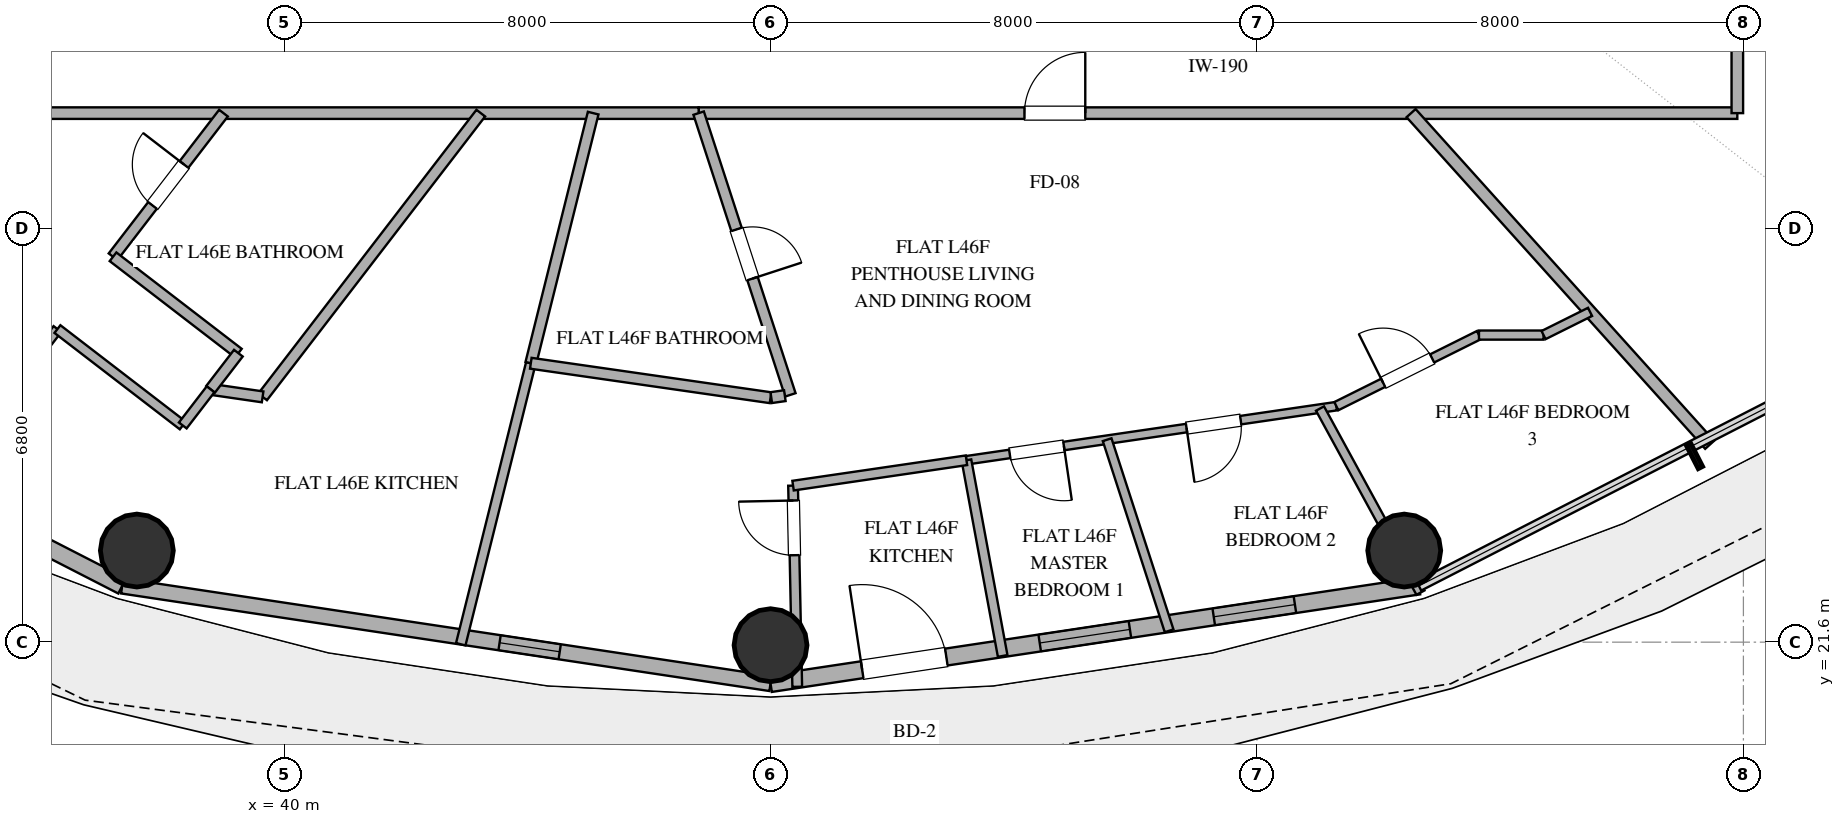
"""IFC4 building model, lengths in metres.
Left out: names, types, materials, properties, quantities, classifications, styles, units other than length and angle.
Written with IfcOpenShell. Run it as: python <this file> out.ifc"""

import sys

from ifc_helpers import new_model, si_unit, direction, frame, frame_2d, origin, origin_2d, place, context, subcontext, project, spatial, rectangle, hollow_circle, extrude, element, fill, save


model = new_model("IFC4")
c1 = context("Model", 3, precision=1e-05, world=origin(), true_north=direction((0.0, 1.0)))
c2 = subcontext(c1, "Body", "Model", "MODEL_VIEW")
j1 = project(units=[si_unit("LENGTHUNIT", "METRE"), si_unit("PLANEANGLEUNIT", "RADIAN")], contexts=[c1])
p1 = place(None, origin())
s1 = spatial("IfcSite", under=j1, at=p1, CompositionType="ELEMENT")
p2 = place(p1, origin())
s2 = spatial("IfcBuilding", under=s1, at=p2, CompositionType="ELEMENT")
p3 = place(p2, frame((0.0, 0.0, 183.0)))
s3 = spatial("IfcBuildingStorey", under=s2, at=p3, CompositionType="ELEMENT", Elevation=183.0)
for number, where, z_axis, x_axis in (
    (1, (37.578, 23.107, 0.0), (0.0, 0.0, 1.0), (1.0, 0.0, 0.0)),
    (2, (48.0, 21.55, 0.0), (0.0, 0.0, 1.0), (1.0, 0.0, 0.0)),
    (3, (58.422, 23.107, 0.0), (0.0, 0.0, 1.0), (1.0, 0.0, 0.0)),
):
    element("IfcColumn", number, at=place(p3, frame(where, z_axis=z_axis, x_axis=x_axis)), inside=s3, PredefinedType="COLUMN", context=c2, shape_type="SweptSolid", body=[
        extrude(hollow_circle(Radius=0.6, WallThickness=0.032, at=origin_2d()), origin(), (0.0, 0.0, 1.0), 3.38),
    ])
p4 = place(p3, frame((28.424, 27.094, 0.0), z_axis=(0.0, 0.0, 1.0), x_axis=(0.889872523182, -0.456209263919, 0.0)))
e4 = element("IfcWall", 4, at=p4, inside=s3, PredefinedType="SOLIDWALL", context=c2, shape_type="SweptSolid", body=[
    extrude(rectangle(XDim=10.016, YDim=0.28, at=frame_2d((5.008, 0.0))), origin(), (0.0, 0.0, 1.0), 3.38),
])
p5 = place(p4, frame((1.95, 0.0, 0.85)))
e5 = element("IfcOpeningElement", 5, at=p5, cuts=e4, PredefinedType="OPENING", context=c2, shape_type="SweptSolid", body=[
    extrude(rectangle(XDim=1.8, YDim=2.2, at=frame_2d((0.9, 1.1))), frame((0.0, 0.15, 0.0), z_axis=(0.0, -1.0, 0.0), x_axis=(1.0, 0.0, 0.0)), (0.0, 0.0, 1.0), 0.3),
])
p6 = place(p4, frame((4.109, 0.0, 0.85)))
e6 = element("IfcOpeningElement", 6, at=p6, cuts=e4, PredefinedType="OPENING", context=c2, shape_type="SweptSolid", body=[
    extrude(rectangle(XDim=1.8, YDim=2.2, at=frame_2d((0.9, 1.1))), frame((0.0, 0.15, 0.0), z_axis=(0.0, -1.0, 0.0), x_axis=(1.0, 0.0, 0.0)), (0.0, 0.0, 1.0), 0.3),
])
p7 = place(p4, frame((6.842, 0.0, 0.85)))
e7 = element("IfcOpeningElement", 7, at=p7, cuts=e4, PredefinedType="OPENING", context=c2, shape_type="SweptSolid", body=[
    extrude(rectangle(XDim=1.65, YDim=2.0, at=frame_2d((0.825, 1.0))), frame((0.0, 0.15, 0.0), z_axis=(0.0, -1.0, 0.0), x_axis=(1.0, 0.0, 0.0)), (0.0, 0.0, 1.0), 0.3),
])
p8 = place(p3, frame((37.337, 22.525, 0.0), z_axis=(0.0, 0.0, 1.0), x_axis=(0.988863993413, -0.148822049884, 0.0)))
e8 = element("IfcWall", 8, at=p8, inside=s3, PredefinedType="SOLIDWALL", context=c2, shape_type="SweptSolid", body=[
    extrude(rectangle(XDim=10.783, YDim=0.25, at=frame_2d((5.392, 0.0))), origin(), (0.0, 0.0, 1.0), 3.38),
])
p9 = place(p8, frame((6.276, 0.0, 0.35)))
e9 = element("IfcOpeningElement", 9, at=p9, cuts=e8, PredefinedType="OPENING", context=c2, shape_type="SweptSolid", body=[
    extrude(rectangle(XDim=1.0, YDim=1.05, at=frame_2d((0.5, 0.525))), frame((0.0, 0.135, 0.0), z_axis=(0.0, -1.0, 0.0), x_axis=(1.0, 0.0, 0.0)), (0.0, 0.0, 1.0), 0.27),
])
p10 = place(p3, frame((48.0, 20.92, 0.0), z_axis=(0.0, 0.0, 1.0), x_axis=(0.988863993413, 0.148822049884, 0.0)))
e10 = element("IfcWall", 10, at=p10, inside=s3, PredefinedType="SOLIDWALL", context=c2, shape_type="SweptSolid", body=[
    extrude(rectangle(XDim=10.783, YDim=0.28, at=frame_2d((5.392, 0.0))), origin(), (0.0, 0.0, 1.0), 3.38),
])
p11 = place(p10, frame((1.524, 0.0, 0.0)))
e11 = element("IfcOpeningElement", 11, at=p11, cuts=e10, PredefinedType="OPENING", context=c2, shape_type="SweptSolid", body=[
    extrude(rectangle(XDim=1.4, YDim=2.2, at=frame_2d((0.7, 1.1))), frame((0.0, 0.15, 0.0), z_axis=(0.0, -1.0, 0.0), x_axis=(1.0, 0.0, 0.0)), (0.0, 0.0, 1.0), 0.3),
])
p12 = place(p10, frame((4.477, 0.0, 0.85)))
e12 = element("IfcOpeningElement", 12, at=p12, cuts=e10, PredefinedType="OPENING", context=c2, shape_type="SweptSolid", body=[
    extrude(rectangle(XDim=1.5, YDim=1.8, at=frame_2d((0.75, 0.9))), frame((0.0, 0.15, 0.0), z_axis=(0.0, -1.0, 0.0), x_axis=(1.0, 0.0, 0.0)), (0.0, 0.0, 1.0), 0.3),
])
p13 = place(p10, frame((7.371, 0.0, 0.85)))
e13 = element("IfcOpeningElement", 13, at=p13, cuts=e10, PredefinedType="OPENING", context=c2, shape_type="SweptSolid", body=[
    extrude(rectangle(XDim=1.35, YDim=1.8, at=frame_2d((0.675, 0.9))), frame((0.0, 0.15, 0.0), z_axis=(0.0, -1.0, 0.0), x_axis=(1.0, 0.0, 0.0)), (0.0, 0.0, 1.0), 0.3),
])
p14 = place(p3, frame((46.818, 30.3, 0.0), z_axis=(0.0, 0.0, 1.0), x_axis=(1.0, 0.0, 0.0)))
e14 = element("IfcWall", 14, at=p14, inside=s3, PredefinedType="PARTITIONING", context=c2, shape_type="SweptSolid", body=[
    extrude(rectangle(XDim=17.082, YDim=0.19, at=frame_2d((8.541, 0.0))), origin(), (0.0, 0.0, 1.0), 2.74),
])
p15 = place(p14, frame((5.358, 0.0, 0.0)))
e15 = element("IfcOpeningElement", 15, at=p15, cuts=e14, PredefinedType="OPENING", context=c2, shape_type="SweptSolid", body=[
    extrude(rectangle(XDim=1.0, YDim=2.2, at=frame_2d((0.5, 1.1))), frame((0.0, 0.105, 0.0), z_axis=(0.0, -1.0, 0.0), x_axis=(1.0, 0.0, 0.0)), (0.0, 0.0, 1.0), 0.21),
])
p16 = place(p3, frame((63.9, 37.474, 0.0), z_axis=(0.0, 0.0, 1.0), x_axis=(0.0, -1.0, 0.0)))
e16 = element("IfcWall", 16, at=p16, inside=s3, PredefinedType="PARTITIONING", context=c2, shape_type="SweptSolid", body=[
    extrude(rectangle(XDim=7.174, YDim=0.19, at=frame_2d((3.587, 0.0))), origin(), (0.0, 0.0, 1.0), 2.74),
])
p17 = place(p16, frame((3.087, 0.0, 0.0)))
e17 = element("IfcOpeningElement", 17, at=p17, cuts=e16, PredefinedType="OPENING", context=c2, shape_type="SweptSolid", body=[
    extrude(rectangle(XDim=1.0, YDim=2.2, at=frame_2d((0.5, 1.1))), frame((0.0, 0.105, 0.0), z_axis=(0.0, -1.0, 0.0), x_axis=(1.0, 0.0, 0.0)), (0.0, 0.0, 1.0), 0.21),
])
p18 = place(p3, frame((46.818, 30.3, 0.0), z_axis=(0.0, 0.0, 1.0), x_axis=(-1.0, 0.0, 0.0)))
e18 = element("IfcWall", 18, at=p18, inside=s3, PredefinedType="PARTITIONING", context=c2, shape_type="SweptSolid", body=[
    extrude(rectangle(XDim=14.718, YDim=0.19, at=frame_2d((7.359, 0.0))), origin(), (0.0, 0.0, 1.0), 2.74),
])
p19 = place(p3, frame((39.646, 25.634, 0.0), z_axis=(0.0, 0.0, 1.0), x_axis=(0.609572446913, 0.792730365234, 0.0)))
e19 = element("IfcWall", 19, at=p19, inside=s3, PredefinedType="PLUMBINGWALL", context=c2, shape_type="SweptSolid", body=[
    extrude(rectangle(XDim=5.886, YDim=0.18, at=frame_2d((2.943, 0.0))), origin(), (0.0, 0.0, 1.0), 2.74),
])
p20 = place(p3, frame((46.818, 30.3, 0.0), z_axis=(0.0, 0.0, 1.0), x_axis=(0.309560761104, -0.950879663882, 0.0)))
e20 = element("IfcWall", 20, at=p20, inside=s3, PredefinedType="PLUMBINGWALL", context=c2, shape_type="SweptSolid", body=[
    extrude(rectangle(XDim=4.872, YDim=0.18, at=frame_2d((2.436, 0.0))), origin(), (0.0, 0.0, 1.0), 2.74),
])
p21 = place(p20, frame((2.011, 0.0, 0.0)))
e21 = element("IfcOpeningElement", 21, at=p21, cuts=e20, PredefinedType="OPENING", context=c2, shape_type="SweptSolid", body=[
    extrude(rectangle(XDim=0.85, YDim=2.1, at=frame_2d((0.425, 1.05))), frame((0.0, 0.1, 0.0), z_axis=(0.0, -1.0, 0.0), x_axis=(1.0, 0.0, 0.0)), (0.0, 0.0, 1.0), 0.2),
])
p22 = place(p3, frame((42.905, 21.566, 0.0), z_axis=(0.0, 0.0, 1.0), x_axis=(0.24192039409, 0.970296100643, 0.0)))
e22 = element("IfcWall", 22, at=p22, inside=s3, PredefinedType="PLUMBINGWALL", context=c2, shape_type="SweptSolid", body=[
    extrude(rectangle(XDim=4.762, YDim=0.16, at=frame_2d((2.381, 0.0))), origin(), (0.0, 0.0, 1.0), 2.74),
])
p23 = place(p3, frame((63.445, 24.846, 0.0), z_axis=(0.0, 0.0, 1.0), x_axis=(-0.669111750453, 0.743161802979, 0.0)))
e23 = element("IfcWall", 23, at=p23, inside=s3, PredefinedType="PARTITIONING", context=c2, shape_type="SweptSolid", body=[
    extrude(rectangle(XDim=7.339, YDim=0.2, at=frame_2d((3.669, 0.0))), origin(), (0.0, 0.0, 1.0), 2.74),
])
p24 = place(p3, frame((44.057, 26.187, 0.0), z_axis=(0.0, 0.0, 1.0), x_axis=(0.241939344098, 0.97029137571, 0.0)))
e24 = element("IfcWall", 24, at=p24, inside=s3, PredefinedType="PLUMBINGWALL", context=c2, shape_type="SweptSolid", body=[
    extrude(rectangle(XDim=4.239, YDim=0.18, at=frame_2d((2.12, 0.0))), origin(), (0.0, 0.0, 1.0), 2.74),
])
p25 = place(p3, frame((48.0, 25.62, 0.0), z_axis=(0.0, 0.0, 1.0), x_axis=(-0.989829001183, 0.14226225226, 0.0)))
e25 = element("IfcWall", 25, at=p25, inside=s3, PredefinedType="PLUMBINGWALL", context=c2, shape_type="SweptSolid", body=[
    extrude(rectangle(XDim=3.983, YDim=0.18, at=frame_2d((1.992, 0.0))), origin(), (0.0, 0.0, 1.0), 2.74),
])
p26 = place(p3, frame((57.305, 25.481, 0.0), z_axis=(0.0, 0.0, 1.0), x_axis=(-0.989473827462, -0.1447119372, 0.0)))
e26 = element("IfcWall", 26, at=p26, inside=s3, PredefinedType="PARTITIONING", context=c2, shape_type="SweptSolid", body=[
    extrude(rectangle(XDim=6.148, YDim=0.14, at=frame_2d((3.074, 0.0))), origin(), (0.0, 0.0, 1.0), 2.74),
])
p27 = place(p26, frame((1.59, 0.0, 0.0)))
e27 = element("IfcOpeningElement", 27, at=p27, cuts=e26, PredefinedType="OPENING", context=c2, shape_type="SweptSolid", body=[
    extrude(rectangle(XDim=0.9, YDim=2.1, at=frame_2d((0.45, 1.05))), frame((0.0, 0.08, 0.0), z_axis=(0.0, -1.0, 0.0), x_axis=(1.0, 0.0, 0.0)), (0.0, 0.0, 1.0), 0.16),
])
p28 = place(p26, frame((4.529, 0.0, 0.0)))
e28 = element("IfcOpeningElement", 28, at=p28, cuts=e26, PredefinedType="OPENING", context=c2, shape_type="SweptSolid", body=[
    extrude(rectangle(XDim=0.9, YDim=2.1, at=frame_2d((0.45, 1.05))), frame((0.0, 0.08, 0.0), z_axis=(0.0, -1.0, 0.0), x_axis=(1.0, 0.0, 0.0)), (0.0, 0.0, 1.0), 0.16),
])
p29 = place(p3, frame((57.037, 25.442, 0.0), z_axis=(0.0, 0.0, 1.0), x_axis=(0.479035633035, -0.877795455834, 0.0)))
e29 = element("IfcWall", 29, at=p29, inside=s3, PredefinedType="PARTITIONING", context=c2, shape_type="SweptSolid", body=[
    extrude(rectangle(XDim=3.449, YDim=0.15, at=frame_2d((1.724, 0.0))), origin(), (0.0, 0.0, 1.0), 2.74),
])
p30 = place(p3, frame((34.17, 24.016, 0.0), z_axis=(0.0, 0.0, 1.0), x_axis=(0.609597828201, 0.792710847568, 0.0)))
e30 = element("IfcWall", 30, at=p30, inside=s3, PredefinedType="PLUMBINGWALL", context=c2, shape_type="SweptSolid", body=[
    extrude(rectangle(XDim=3.448, YDim=0.16, at=frame_2d((1.724, 0.0))), origin(), (0.0, 0.0, 1.0), 2.74),
])
p31 = place(p30, frame((1.334, 0.0, 0.0)))
e31 = element("IfcOpeningElement", 31, at=p31, cuts=e30, PredefinedType="OPENING", context=c2, shape_type="SweptSolid", body=[
    extrude(rectangle(XDim=0.9, YDim=2.1, at=frame_2d((0.45, 1.05))), frame((0.0, 0.09, 0.0), z_axis=(0.0, -1.0, 0.0), x_axis=(1.0, 0.0, 0.0)), (0.0, 0.0, 1.0), 0.18),
])
p32 = place(p3, frame((48.439, 20.866, 0.0), z_axis=(0.0, 0.0, 1.0), x_axis=(-0.020804233052, 0.999783568522, 0.0)))
e32 = element("IfcWall", 32, at=p32, inside=s3, PredefinedType="PLUMBINGWALL", context=c2, shape_type="SweptSolid", body=[
    extrude(rectangle(XDim=3.309, YDim=0.16, at=frame_2d((1.655, 0.0))), origin(), (0.0, 0.0, 1.0), 2.74),
])
p33 = place(p32, frame((2.165, 0.0, 0.0)))
e33 = element("IfcOpeningElement", 33, at=p33, cuts=e32, PredefinedType="OPENING", context=c2, shape_type="SweptSolid", body=[
    extrude(rectangle(XDim=0.9, YDim=2.1, at=frame_2d((0.45, 1.05))), frame((0.0, 0.09, 0.0), z_axis=(0.0, -1.0, 0.0), x_axis=(1.0, 0.0, 0.0)), (0.0, 0.0, 1.0), 0.18),
])
p34 = place(p3, frame((54.555, 21.787, 0.0), z_axis=(0.0, 0.0, 1.0), x_axis=(-0.308436028498, 0.951245087411, 0.0)))
e34 = element("IfcWall", 34, at=p34, inside=s3, PredefinedType="PARTITIONING", context=c2, shape_type="SweptSolid", body=[
    extrude(rectangle(XDim=3.304, YDim=0.15, at=frame_2d((1.652, 0.0))), origin(), (0.0, 0.0, 1.0), 2.74),
])
p35 = place(p3, frame((51.222, 24.591, 0.0), z_axis=(0.0, 0.0, 1.0), x_axis=(0.181950347297, -0.983307719444, 0.0)))
e35 = element("IfcWall", 35, at=p35, inside=s3, PredefinedType="PLUMBINGWALL", context=c2, shape_type="SweptSolid", body=[
    extrude(rectangle(XDim=3.273, YDim=0.16, at=frame_2d((1.636, 0.0))), origin(), (0.0, 0.0, 1.0), 2.74),
])
p36 = place(p3, frame((37.186, 27.938, 0.0), z_axis=(0.0, 0.0, 1.0), x_axis=(0.609591964346, 0.792715356862, 0.0)))
e36 = element("IfcWall", 36, at=p36, inside=s3, PredefinedType="PLUMBINGWALL", context=c2, shape_type="SweptSolid", body=[
    extrude(rectangle(XDim=2.98, YDim=0.18, at=frame_2d((1.49, 0.0))), origin(), (0.0, 0.0, 1.0), 2.74),
])
p37 = place(p36, frame((1.065, 0.0, 0.0)))
e37 = element("IfcOpeningElement", 37, at=p37, cuts=e36, PredefinedType="OPENING", context=c2, shape_type="SweptSolid", body=[
    extrude(rectangle(XDim=0.85, YDim=2.1, at=frame_2d((0.425, 1.05))), frame((0.0, 0.1, 0.0), z_axis=(0.0, -1.0, 0.0), x_axis=(1.0, 0.0, 0.0)), (0.0, 0.0, 1.0), 0.2),
])
p38 = place(p3, frame((48.37, 24.174, 0.0), z_axis=(0.0, 0.0, 1.0), x_axis=(0.98947822579, 0.144681860256, 0.0)))
e38 = element("IfcWall", 38, at=p38, inside=s3, PredefinedType="PLUMBINGWALL", context=c2, shape_type="SweptSolid", body=[
    extrude(rectangle(XDim=2.882, YDim=0.16, at=frame_2d((1.441, 0.0))), origin(), (0.0, 0.0, 1.0), 2.74),
])
p39 = place(p3, frame((57.305, 25.481, 0.0), z_axis=(0.0, 0.0, 1.0), x_axis=(0.895041110332, 0.445983644112, 0.0)))
e39 = element("IfcWall", 39, at=p39, inside=s3, PredefinedType="PARTITIONING", context=c2, shape_type="SweptSolid", body=[
    extrude(rectangle(XDim=2.621, YDim=0.15, at=frame_2d((1.311, 0.0))), origin(), (0.0, 0.0, 1.0), 2.74),
])
p40 = place(p39, frame((0.861, 0.0, 0.0)))
e40 = element("IfcOpeningElement", 40, at=p40, cuts=e39, PredefinedType="OPENING", context=c2, shape_type="SweptSolid", body=[
    extrude(rectangle(XDim=0.9, YDim=2.1, at=frame_2d((0.45, 1.05))), frame((0.0, 0.085, 0.0), z_axis=(0.0, -1.0, 0.0), x_axis=(1.0, 0.0, 0.0)), (0.0, 0.0, 1.0), 0.17),
])
p41 = place(p3, frame((39.248, 26.353, 0.0), z_axis=(0.0, 0.0, 1.0), x_axis=(-0.792732166763, 0.609570104073, 0.0)))
e41 = element("IfcWall", 41, at=p41, inside=s3, PredefinedType="PLUMBINGWALL", context=c2, shape_type="SweptSolid", body=[
    extrude(rectangle(XDim=2.601, YDim=0.18, at=frame_2d((1.3, 0.0))), origin(), (0.0, 0.0, 1.0), 2.74),
])
p42 = place(p3, frame((36.272, 26.749, 0.0), z_axis=(0.0, 0.0, 1.0), x_axis=(0.792742649864, -0.609556470794, 0.0)))
e42 = element("IfcWall", 42, at=p42, inside=s3, PredefinedType="PLUMBINGWALL", context=c2, shape_type="SweptSolid", body=[
    extrude(rectangle(XDim=2.6, YDim=0.16, at=frame_2d((1.3, 0.0))), origin(), (0.0, 0.0, 1.0), 2.74),
])
p43 = place(p3, frame((59.651, 26.65, 0.0), z_axis=(0.0, 0.0, 1.0), x_axis=(1.0, 0.0, 0.0)))
e43 = element("IfcWall", 43, at=p43, inside=s3, PredefinedType="PARTITIONING", context=c2, shape_type="SweptSolid", body=[
    extrude(rectangle(XDim=1.062, YDim=0.15, at=frame_2d((0.531, 0.0))), origin(), (0.0, 0.0, 1.0), 2.74),
])
p44 = place(p3, frame((38.791, 25.758, 0.0), z_axis=(0.0, 0.0, 1.0), x_axis=(0.989584977247, -0.143949896861, 0.0)))
e44 = element("IfcWall", 44, at=p44, inside=s3, PredefinedType="PLUMBINGWALL", context=c2, shape_type="SweptSolid", body=[
    extrude(rectangle(XDim=0.865, YDim=0.18, at=frame_2d((0.433, 0.0))), origin(), (0.0, 0.0, 1.0), 2.74),
])
p45 = place(p3, frame((60.713, 26.65, 0.0), z_axis=(0.0, 0.0, 1.0), x_axis=(0.894826947278, 0.446413188006, 0.0)))
e45 = element("IfcWall", 45, at=p45, inside=s3, PredefinedType="PARTITIONING", context=c2, shape_type="SweptSolid", body=[
    extrude(rectangle(XDim=0.854, YDim=0.15, at=frame_2d((0.427, 0.0))), origin(), (0.0, 0.0, 1.0), 2.74),
])
p46 = place(p3, frame((38.791, 25.758, 0.0), z_axis=(0.0, 0.0, 1.0), x_axis=(0.609695029381, 0.792636089986, 0.0)))
e46 = element("IfcWall", 46, at=p46, inside=s3, PredefinedType="PLUMBINGWALL", context=c2, shape_type="SweptSolid", body=[
    extrude(rectangle(XDim=0.75, YDim=0.18, at=frame_2d((0.375, 0.0))), origin(), (0.0, 0.0, 1.0), 2.74),
])
p47 = place(p3, frame((38.333, 25.164, 0.0), z_axis=(0.0, 0.0, 1.0), x_axis=(0.609695029381, 0.792636089986, 0.0)))
e47 = element("IfcWall", 47, at=p47, inside=s3, PredefinedType="PLUMBINGWALL", context=c2, shape_type="SweptSolid", body=[
    extrude(rectangle(XDim=0.75, YDim=0.16, at=frame_2d((0.375, 0.0))), origin(), (0.0, 0.0, 1.0), 2.74),
])
p48 = place(p3, frame((48.235, 25.654, 0.0), z_axis=(0.0, 0.0, 1.0), x_axis=(-0.989709601841, -0.143090544844, 0.0)))
e48 = element("IfcWall", 48, at=p48, inside=s3, PredefinedType="PLUMBINGWALL", context=c2, shape_type="SweptSolid", body=[
    extrude(rectangle(XDim=0.225, YDim=0.18, at=frame_2d((0.113, 0.0))), origin(), (0.0, 0.0, 1.0), 2.74),
])
p49 = place(p11, origin())
e49 = element("IfcDoor", 49, at=p49, inside=s3, OperationType="SINGLE_SWING_LEFT", PredefinedType="DOOR", context=c2, shape_type="SweptSolid", body=[
    extrude(rectangle(XDim=1.4, YDim=2.2, at=frame_2d((0.7, 1.1))), frame((0.0, 0.025, 0.0), z_axis=(0.0, -1.0, 0.0), x_axis=(1.0, 0.0, 0.0)), (0.0, 0.0, 1.0), 0.05),
])
fill(e11, e49)
p50 = place(p12, origin())
e50 = element("IfcWindow", 50, at=p50, inside=s3, PartitioningType="SINGLE_PANEL", PredefinedType="WINDOW", context=c2, shape_type="SweptSolid", body=[
    extrude(rectangle(XDim=1.5, YDim=1.8, at=frame_2d((0.75, 0.9))), frame((0.0, 0.03, 0.0), z_axis=(0.0, -1.0, 0.0), x_axis=(1.0, 0.0, 0.0)), (0.0, 0.0, 1.0), 0.06),
])
fill(e12, e50)
p51 = place(p13, origin())
e51 = element("IfcWindow", 51, at=p51, inside=s3, PartitioningType="SINGLE_PANEL", PredefinedType="WINDOW", context=c2, shape_type="SweptSolid", body=[
    extrude(rectangle(XDim=1.35, YDim=1.8, at=frame_2d((0.675, 0.9))), frame((0.0, 0.03, 0.0), z_axis=(0.0, -1.0, 0.0), x_axis=(1.0, 0.0, 0.0)), (0.0, 0.0, 1.0), 0.06),
])
fill(e13, e51)
p52 = place(p9, origin())
e52 = element("IfcWindow", 52, at=p52, inside=s3, PartitioningType="SINGLE_PANEL", PredefinedType="WINDOW", context=c2, shape_type="SweptSolid", body=[
    extrude(rectangle(XDim=1.0, YDim=1.05, at=frame_2d((0.5, 0.525))), frame((0.0, 0.03, 0.0), z_axis=(0.0, -1.0, 0.0), x_axis=(1.0, 0.0, 0.0)), (0.0, 0.0, 1.0), 0.06),
])
fill(e9, e52)
p53 = place(p15, origin())
e53 = element("IfcDoor", 53, at=p53, inside=s3, OperationType="SINGLE_SWING_RIGHT", PredefinedType="DOOR", context=c2, shape_type="SweptSolid", body=[
    extrude(rectangle(XDim=1.0, YDim=2.2, at=frame_2d((0.5, 1.1))), frame((0.0, 0.025, 0.0), z_axis=(0.0, -1.0, 0.0), x_axis=(1.0, 0.0, 0.0)), (0.0, 0.0, 1.0), 0.05),
])
fill(e15, e53)
p54 = place(p21, origin())
e54 = element("IfcDoor", 54, at=p54, inside=s3, OperationType="SINGLE_SWING_RIGHT", PredefinedType="DOOR", context=c2, shape_type="SweptSolid", body=[
    extrude(rectangle(XDim=0.85, YDim=2.1, at=frame_2d((0.425, 1.05))), frame((0.0, 0.025, 0.0), z_axis=(0.0, -1.0, 0.0), x_axis=(1.0, 0.0, 0.0)), (0.0, 0.0, 1.0), 0.05),
])
fill(e21, e54)
p55 = place(p27, origin())
e55 = element("IfcDoor", 55, at=p55, inside=s3, OperationType="SINGLE_SWING_RIGHT", PredefinedType="DOOR", context=c2, shape_type="SweptSolid", body=[
    extrude(rectangle(XDim=0.9, YDim=2.1, at=frame_2d((0.45, 1.05))), frame((0.0, 0.025, 0.0), z_axis=(0.0, -1.0, 0.0), x_axis=(1.0, 0.0, 0.0)), (0.0, 0.0, 1.0), 0.05),
])
fill(e27, e55)
p56 = place(p28, origin())
e56 = element("IfcDoor", 56, at=p56, inside=s3, OperationType="SINGLE_SWING_LEFT", PredefinedType="DOOR", context=c2, shape_type="SweptSolid", body=[
    extrude(rectangle(XDim=0.9, YDim=2.1, at=frame_2d((0.45, 1.05))), frame((0.0, 0.025, 0.0), z_axis=(0.0, -1.0, 0.0), x_axis=(1.0, 0.0, 0.0)), (0.0, 0.0, 1.0), 0.05),
])
fill(e28, e56)
p57 = place(p33, origin())
e57 = element("IfcDoor", 57, at=p57, inside=s3, OperationType="SINGLE_SWING_RIGHT", PredefinedType="DOOR", context=c2, shape_type="SweptSolid", body=[
    extrude(rectangle(XDim=0.9, YDim=2.1, at=frame_2d((0.45, 1.05))), frame((0.0, 0.025, 0.0), z_axis=(0.0, -1.0, 0.0), x_axis=(1.0, 0.0, 0.0)), (0.0, 0.0, 1.0), 0.05),
])
fill(e33, e57)
p58 = place(p37, origin())
e58 = element("IfcDoor", 58, at=p58, inside=s3, OperationType="SINGLE_SWING_RIGHT", PredefinedType="DOOR", context=c2, shape_type="SweptSolid", body=[
    extrude(rectangle(XDim=0.85, YDim=2.1, at=frame_2d((0.425, 1.05))), frame((0.0, 0.025, 0.0), z_axis=(0.0, -1.0, 0.0), x_axis=(1.0, 0.0, 0.0)), (0.0, 0.0, 1.0), 0.05),
])
fill(e37, e58)
p59 = place(p40, origin())
e59 = element("IfcDoor", 59, at=p59, inside=s3, OperationType="SINGLE_SWING_LEFT", PredefinedType="DOOR", context=c2, shape_type="SweptSolid", body=[
    extrude(rectangle(XDim=0.9, YDim=2.1, at=frame_2d((0.45, 1.05))), frame((0.0, 0.025, 0.0), z_axis=(0.0, -1.0, 0.0), x_axis=(1.0, 0.0, 0.0)), (0.0, 0.0, 1.0), 0.05),
])
fill(e40, e59)
save(model, sys.argv[1])
